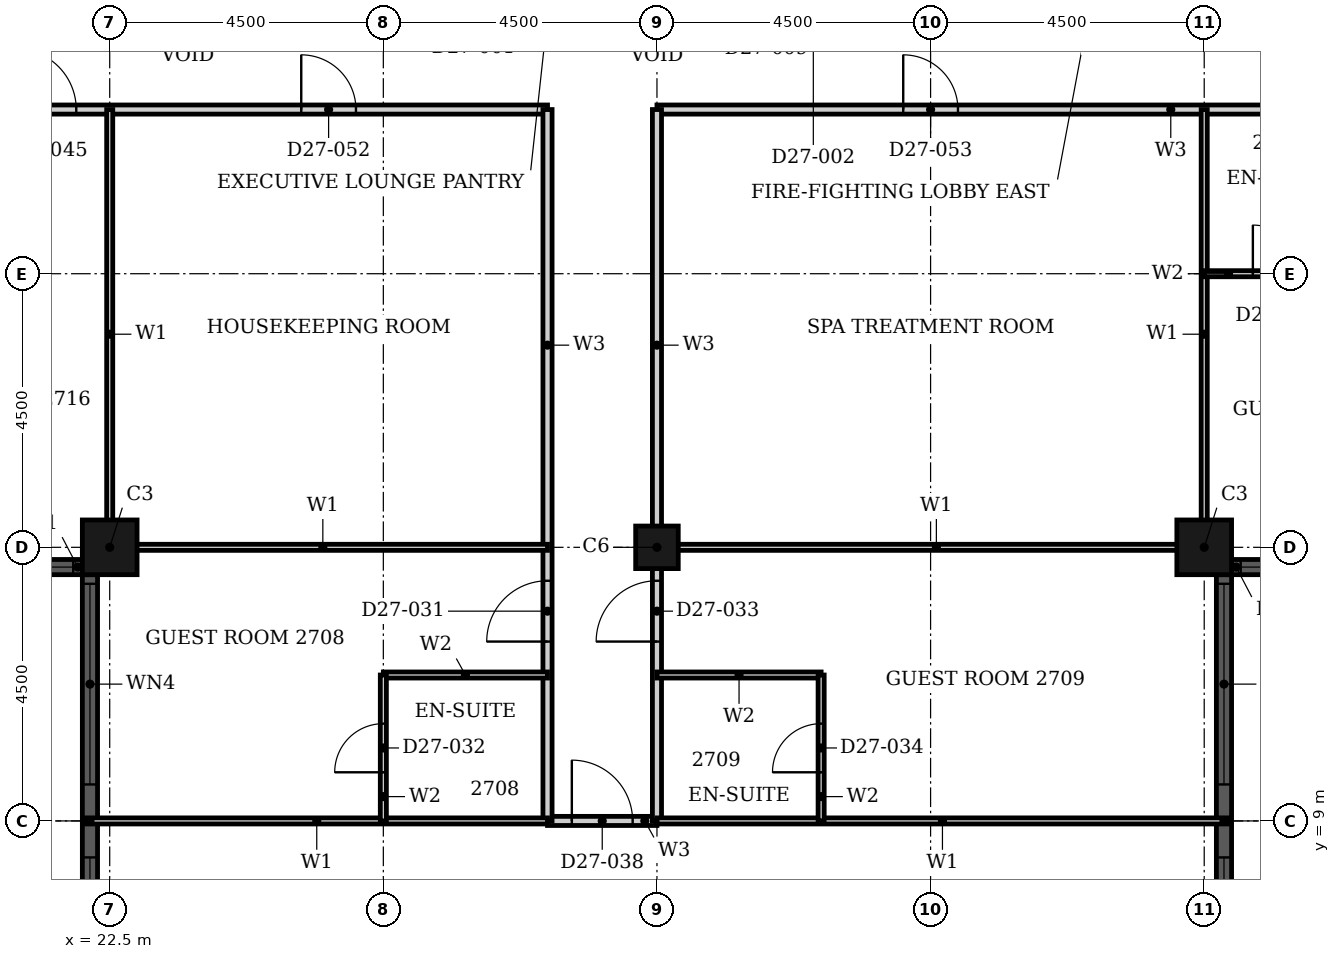
"""IFC4 building model, lengths in metres.
Left out: names, types, materials, properties, quantities, classifications, styles, units other than length and angle.
Written with IfcOpenShell. Run it as: python <this file> out.ifc"""

import sys

from ifc_helpers import new_model, si_unit, direction, frame, frame_2d, origin, origin_2d, place, context, subcontext, project, spatial, rectangle, hollow_rectangle, extrude, element, fill, save


model = new_model("IFC4")
c1 = context("Model", 3, precision=1e-05, world=origin(), true_north=direction((0.0, 1.0)))
c2 = subcontext(c1, "Body", "Model", "MODEL_VIEW")
j1 = project(units=[si_unit("LENGTHUNIT", "METRE"), si_unit("PLANEANGLEUNIT", "RADIAN")], contexts=[c1])
p1 = place(None, origin())
s1 = spatial("IfcSite", under=j1, at=p1, CompositionType="ELEMENT")
p2 = place(p1, origin())
s2 = spatial("IfcBuilding", under=s1, at=p2, CompositionType="ELEMENT")
p3 = place(p2, frame((0.0, 0.0, 111.6)))
s3 = spatial("IfcBuildingStorey", under=s2, at=p3, CompositionType="ELEMENT", Elevation=111.6)
for number, where, z_axis, x_axis in (
    (1, (40.5, 13.5, 0.0), (0.0, 0.0, 1.0), (1.0, 0.0, 0.0)),
    (2, (22.5, 13.5, 0.0), (0.0, 0.0, 1.0), (1.0, 0.0, 0.0)),
):
    element("IfcColumn", number, at=place(p3, frame(where, z_axis=z_axis, x_axis=x_axis)), inside=s3, PredefinedType="COLUMN", context=c2, shape_type="SweptSolid", body=[
        extrude(hollow_rectangle(XDim=0.9, YDim=0.9, WallThickness=0.028, at=origin_2d()), origin(), (0.0, 0.0, 1.0), 3.6),
    ])
p4 = place(p3, frame((31.5, 13.5, 0.0), z_axis=(0.0, 0.0, 1.0), x_axis=(1.0, 0.0, 0.0)))
e3 = element("IfcColumn", 3, at=p4, inside=s3, PredefinedType="COLUMN", context=c2, shape_type="SweptSolid", body=[
    extrude(hollow_rectangle(XDim=0.7, YDim=0.7, WallThickness=0.022, at=origin_2d()), origin(), (0.0, 0.0, 1.0), 3.6),
])
p5 = place(p3, frame((40.825, 4.95, 0.0), z_axis=(0.0, 0.0, 1.0), x_axis=(0.0, 1.0, 0.0)))
e4 = element("IfcWall", 4, at=p5, inside=s3, PredefinedType="SOLIDWALL", context=c2, shape_type="SweptSolid", body=[
    extrude(rectangle(XDim=8.1, YDim=0.25, at=frame_2d((4.05, 0.0))), origin(), (0.0, 0.0, 1.0), 3.6),
])
p6 = place(p5, frame((0.15, 0.0, 0.9)))
e5 = element("IfcOpeningElement", 5, at=p6, cuts=e4, PredefinedType="OPENING", context=c2, shape_type="SweptSolid", body=[
    extrude(rectangle(XDim=3.3, YDim=2.08, at=frame_2d((1.65, 1.04))), frame((0.0, 0.135, 0.0), z_axis=(0.0, -1.0, 0.0), x_axis=(1.0, 0.0, 0.0)), (0.0, 0.0, 1.0), 0.27),
])
p7 = place(p5, frame((4.65, 0.0, 0.9)))
e6 = element("IfcOpeningElement", 6, at=p7, cuts=e4, PredefinedType="OPENING", context=c2, shape_type="SweptSolid", body=[
    extrude(rectangle(XDim=3.3, YDim=2.08, at=frame_2d((1.65, 1.04))), frame((0.0, 0.135, 0.0), z_axis=(0.0, -1.0, 0.0), x_axis=(1.0, 0.0, 0.0)), (0.0, 0.0, 1.0), 0.27),
])
p8 = place(p3, frame((40.95, 13.175, 0.0), z_axis=(0.0, 0.0, 1.0), x_axis=(1.0, 0.0, 0.0)))
e7 = element("IfcWall", 7, at=p8, inside=s3, PredefinedType="SOLIDWALL", context=c2, shape_type="SweptSolid", body=[
    extrude(rectangle(XDim=3.6, YDim=0.25, at=frame_2d((1.8, 0.0))), origin(), (0.0, 0.0, 1.0), 3.6),
])
p9 = place(p8, frame((0.15, 0.0, 0.9)))
e8 = element("IfcOpeningElement", 8, at=p9, cuts=e7, PredefinedType="OPENING", context=c2, shape_type="SweptSolid", body=[
    extrude(rectangle(XDim=3.3, YDim=2.08, at=frame_2d((1.65, 1.04))), frame((0.0, 0.135, 0.0), z_axis=(0.0, -1.0, 0.0), x_axis=(1.0, 0.0, 0.0)), (0.0, 0.0, 1.0), 0.27),
])
p10 = place(p3, frame((18.45, 13.175, 0.0), z_axis=(0.0, 0.0, 1.0), x_axis=(1.0, 0.0, 0.0)))
e9 = element("IfcWall", 9, at=p10, inside=s3, PredefinedType="SOLIDWALL", context=c2, shape_type="SweptSolid", body=[
    extrude(rectangle(XDim=3.6, YDim=0.25, at=frame_2d((1.8, 0.0))), origin(), (0.0, 0.0, 1.0), 3.6),
])
p11 = place(p10, frame((0.15, 0.0, 0.9)))
e10 = element("IfcOpeningElement", 10, at=p11, cuts=e9, PredefinedType="OPENING", context=c2, shape_type="SweptSolid", body=[
    extrude(rectangle(XDim=3.3, YDim=2.08, at=frame_2d((1.65, 1.04))), frame((0.0, 0.135, 0.0), z_axis=(0.0, -1.0, 0.0), x_axis=(1.0, 0.0, 0.0)), (0.0, 0.0, 1.0), 0.27),
])
p12 = place(p3, frame((22.175, 13.05, 0.0), z_axis=(0.0, 0.0, 1.0), x_axis=(0.0, -1.0, 0.0)))
e11 = element("IfcWall", 11, at=p12, inside=s3, PredefinedType="SOLIDWALL", context=c2, shape_type="SweptSolid", body=[
    extrude(rectangle(XDim=8.1, YDim=0.25, at=frame_2d((4.05, 0.0))), origin(), (0.0, 0.0, 1.0), 3.6),
])
p13 = place(p12, frame((0.15, 0.0, 0.9)))
e12 = element("IfcOpeningElement", 12, at=p13, cuts=e11, PredefinedType="OPENING", context=c2, shape_type="SweptSolid", body=[
    extrude(rectangle(XDim=3.3, YDim=2.08, at=frame_2d((1.65, 1.04))), frame((0.0, 0.135, 0.0), z_axis=(0.0, -1.0, 0.0), x_axis=(1.0, 0.0, 0.0)), (0.0, 0.0, 1.0), 0.27),
])
p14 = place(p12, frame((4.65, 0.0, 0.9)))
e13 = element("IfcOpeningElement", 13, at=p14, cuts=e11, PredefinedType="OPENING", context=c2, shape_type="SweptSolid", body=[
    extrude(rectangle(XDim=3.3, YDim=2.08, at=frame_2d((1.65, 1.04))), frame((0.0, 0.135, 0.0), z_axis=(0.0, -1.0, 0.0), x_axis=(1.0, 0.0, 0.0)), (0.0, 0.0, 1.0), 0.27),
])
p15 = place(p3, frame((16.2, 20.7, 0.0), z_axis=(0.0, 0.0, 1.0), x_axis=(1.0, 0.0, 0.0)))
e14 = element("IfcWall", 14, at=p15, inside=s3, PredefinedType="PARTITIONING", context=c2, shape_type="SweptSolid", body=[
    extrude(rectangle(XDim=13.5, YDim=0.15, at=frame_2d((6.75, 0.0))), origin(), (0.0, 0.0, 1.0), 3.3),
])
p16 = place(p15, frame((4.75, 0.0, 0.0)))
e15 = element("IfcOpeningElement", 15, at=p16, cuts=e14, PredefinedType="OPENING", context=c2, shape_type="SweptSolid", body=[
    extrude(rectangle(XDim=1.0, YDim=2.1, at=frame_2d((0.5, 1.05))), frame((0.0, 0.085, 0.0), z_axis=(0.0, -1.0, 0.0), x_axis=(1.0, 0.0, 0.0)), (0.0, 0.0, 1.0), 0.17),
])
p17 = place(p15, frame((9.45, 0.0, 0.0)))
e16 = element("IfcOpeningElement", 16, at=p17, cuts=e14, PredefinedType="OPENING", context=c2, shape_type="SweptSolid", body=[
    extrude(rectangle(XDim=0.9, YDim=2.1, at=frame_2d((0.45, 1.05))), frame((0.0, 0.085, 0.0), z_axis=(0.0, -1.0, 0.0), x_axis=(1.0, 0.0, 0.0)), (0.0, 0.0, 1.0), 0.17),
])
p18 = place(p3, frame((31.5, 20.7, 0.0), z_axis=(0.0, 0.0, 1.0), x_axis=(1.0, 0.0, 0.0)))
e17 = element("IfcWall", 17, at=p18, inside=s3, PredefinedType="PARTITIONING", context=c2, shape_type="SweptSolid", body=[
    extrude(rectangle(XDim=15.3, YDim=0.15, at=frame_2d((7.65, 0.0))), origin(), (0.0, 0.0, 1.0), 3.3),
])
p19 = place(p18, frame((11.95, 0.0, 0.0)))
e18 = element("IfcOpeningElement", 18, at=p19, cuts=e17, PredefinedType="OPENING", context=c2, shape_type="SweptSolid", body=[
    extrude(rectangle(XDim=1.0, YDim=2.1, at=frame_2d((0.5, 1.05))), frame((0.0, 0.085, 0.0), z_axis=(0.0, -1.0, 0.0), x_axis=(1.0, 0.0, 0.0)), (0.0, 0.0, 1.0), 0.17),
])
p20 = place(p18, frame((13.95, 0.0, 0.0)))
e19 = element("IfcOpeningElement", 19, at=p20, cuts=e17, PredefinedType="OPENING", context=c2, shape_type="SweptSolid", body=[
    extrude(rectangle(XDim=0.9, YDim=2.1, at=frame_2d((0.45, 1.05))), frame((0.0, 0.085, 0.0), z_axis=(0.0, -1.0, 0.0), x_axis=(1.0, 0.0, 0.0)), (0.0, 0.0, 1.0), 0.17),
])
p21 = place(p18, frame((4.05, 0.0, 0.0)))
e20 = element("IfcOpeningElement", 20, at=p21, cuts=e17, PredefinedType="OPENING", context=c2, shape_type="SweptSolid", body=[
    extrude(rectangle(XDim=0.9, YDim=2.1, at=frame_2d((0.45, 1.05))), frame((0.0, 0.085, 0.0), z_axis=(0.0, -1.0, 0.0), x_axis=(1.0, 0.0, 0.0)), (0.0, 0.0, 1.0), 0.17),
])
p22 = place(p3, frame((29.7, 9.0, 0.0), z_axis=(0.0, 0.0, 1.0), x_axis=(1.0, 0.0, 0.0)))
e21 = element("IfcWall", 21, at=p22, inside=s3, PredefinedType="PARTITIONING", context=c2, shape_type="SweptSolid", body=[
    extrude(rectangle(XDim=1.8, YDim=0.15, at=frame_2d((0.9, 0.0))), origin(), (0.0, 0.0, 1.0), 3.3),
])
p23 = place(p22, frame((0.4, 0.0, 0.0)))
e22 = element("IfcOpeningElement", 22, at=p23, cuts=e21, PredefinedType="OPENING", context=c2, shape_type="SweptSolid", body=[
    extrude(rectangle(XDim=1.0, YDim=2.1, at=frame_2d((0.5, 1.05))), frame((0.0, 0.085, 0.0), z_axis=(0.0, -1.0, 0.0), x_axis=(1.0, 0.0, 0.0)), (0.0, 0.0, 1.0), 0.17),
])
p24 = place(p3, frame((29.7, 9.0, 0.0), z_axis=(0.0, 0.0, 1.0), x_axis=(0.0, 1.0, 0.0)))
e23 = element("IfcWall", 23, at=p24, inside=s3, PredefinedType="PARTITIONING", context=c2, shape_type="SweptSolid", body=[
    extrude(rectangle(XDim=11.7, YDim=0.15, at=frame_2d((5.85, 0.0))), origin(), (0.0, 0.0, 1.0), 3.3),
])
p25 = place(p24, frame((2.95, 0.0, 0.0)))
e24 = element("IfcOpeningElement", 24, at=p25, cuts=e23, PredefinedType="OPENING", context=c2, shape_type="SweptSolid", body=[
    extrude(rectangle(XDim=1.0, YDim=2.1, at=frame_2d((0.5, 1.05))), frame((0.0, 0.085, 0.0), z_axis=(0.0, -1.0, 0.0), x_axis=(1.0, 0.0, 0.0)), (0.0, 0.0, 1.0), 0.17),
])
p26 = place(p3, frame((31.5, 9.0, 0.0), z_axis=(0.0, 0.0, 1.0), x_axis=(0.0, 1.0, 0.0)))
e25 = element("IfcWall", 25, at=p26, inside=s3, PredefinedType="PARTITIONING", context=c2, shape_type="SweptSolid", body=[
    extrude(rectangle(XDim=11.7, YDim=0.15, at=frame_2d((5.85, 0.0))), origin(), (0.0, 0.0, 1.0), 2.58),
])
p27 = place(p26, frame((2.95, 0.0, 0.0)))
e26 = element("IfcOpeningElement", 26, at=p27, cuts=e25, PredefinedType="OPENING", context=c2, shape_type="SweptSolid", body=[
    extrude(rectangle(XDim=1.0, YDim=2.1, at=frame_2d((0.5, 1.05))), frame((0.0, 0.085, 0.0), z_axis=(0.0, -1.0, 0.0), x_axis=(1.0, 0.0, 0.0)), (0.0, 0.0, 1.0), 0.17),
])
p28 = place(p3, frame((31.5, 13.5, 0.0), z_axis=(0.0, 0.0, 1.0), x_axis=(1.0, 0.0, 0.0)))
e27 = element("IfcWall", 27, at=p28, inside=s3, PredefinedType="PARTITIONING", context=c2, shape_type="SweptSolid", body=[
    extrude(rectangle(XDim=9.19, YDim=0.1, at=frame_2d((4.595, 0.0))), origin(), (0.0, 0.0, 1.0), 2.38),
])
p29 = place(p3, frame((22.31, 13.5, 0.0), z_axis=(0.0, 0.0, 1.0), x_axis=(1.0, 0.0, 0.0)))
e28 = element("IfcWall", 28, at=p29, inside=s3, PredefinedType="PARTITIONING", context=c2, shape_type="SweptSolid", body=[
    extrude(rectangle(XDim=7.39, YDim=0.1, at=frame_2d((3.695, 0.0))), origin(), (0.0, 0.0, 1.0), 2.38),
])
p30 = place(p3, frame((31.5, 9.0, 0.0), z_axis=(0.0, 0.0, 1.0), x_axis=(1.0, 0.0, 0.0)))
e29 = element("IfcWall", 29, at=p30, inside=s3, PredefinedType="PARTITIONING", context=c2, shape_type="SweptSolid", body=[
    extrude(rectangle(XDim=9.39, YDim=0.1, at=frame_2d((4.695, 0.0))), origin(), (0.0, 0.0, 1.0), 3.3),
])
p31 = place(p3, frame((22.11, 9.0, 0.0), z_axis=(0.0, 0.0, 1.0), x_axis=(1.0, 0.0, 0.0)))
e30 = element("IfcWall", 30, at=p31, inside=s3, PredefinedType="PARTITIONING", context=c2, shape_type="SweptSolid", body=[
    extrude(rectangle(XDim=7.59, YDim=0.1, at=frame_2d((3.795, 0.0))), origin(), (0.0, 0.0, 1.0), 3.3),
])
for number, where, z_axis, x_axis in (
    (31, (22.5, 13.31, 0.0), (0.0, 0.0, 1.0), (0.0, 1.0, 0.0)),
    (32, (40.5, 13.31, 0.0), (0.0, 0.0, 1.0), (0.0, 1.0, 0.0)),
):
    element("IfcWall", number, at=place(p3, frame(where, z_axis=z_axis, x_axis=x_axis)), inside=s3, PredefinedType="PARTITIONING", context=c2, shape_type="SweptSolid", body=[
        extrude(rectangle(XDim=7.39, YDim=0.1, at=frame_2d((3.695, 0.0))), origin(), (0.0, 0.0, 1.0), 3.3),
    ])
for number, where, z_axis, x_axis in (
    (33, (31.5, 11.4, 0.0), (0.0, 0.0, 1.0), (1.0, 0.0, 0.0)),
    (34, (27.0, 11.4, 0.0), (0.0, 0.0, 1.0), (1.0, 0.0, 0.0)),
):
    element("IfcWall", number, at=place(p3, frame(where, z_axis=z_axis, x_axis=x_axis)), inside=s3, PredefinedType="PARTITIONING", context=c2, shape_type="SweptSolid", body=[
        extrude(rectangle(XDim=2.7, YDim=0.1, at=frame_2d((1.35, 0.0))), origin(), (0.0, 0.0, 1.0), 3.3),
    ])
p32 = place(p3, frame((40.5, 18.0, 0.0), z_axis=(0.0, 0.0, 1.0), x_axis=(1.0, 0.0, 0.0)))
e35 = element("IfcWall", 35, at=p32, inside=s3, PredefinedType="PARTITIONING", context=c2, shape_type="SweptSolid", body=[
    extrude(rectangle(XDim=2.4, YDim=0.1, at=frame_2d((1.2, 0.0))), origin(), (0.0, 0.0, 1.0), 3.3),
])
p33 = place(p32, frame((0.8, 0.0, 0.0)))
e36 = element("IfcOpeningElement", 36, at=p33, cuts=e35, PredefinedType="OPENING", context=c2, shape_type="SweptSolid", body=[
    extrude(rectangle(XDim=0.8, YDim=2.1, at=frame_2d((0.4, 1.05))), frame((0.0, 0.06, 0.0), z_axis=(0.0, -1.0, 0.0), x_axis=(1.0, 0.0, 0.0)), (0.0, 0.0, 1.0), 0.12),
])
p34 = place(p3, frame((27.0, 9.0, 0.0), z_axis=(0.0, 0.0, 1.0), x_axis=(0.0, 1.0, 0.0)))
e37 = element("IfcWall", 37, at=p34, inside=s3, PredefinedType="PARTITIONING", context=c2, shape_type="SweptSolid", body=[
    extrude(rectangle(XDim=2.4, YDim=0.1, at=frame_2d((1.2, 0.0))), origin(), (0.0, 0.0, 1.0), 2.58),
])
p35 = place(p34, frame((0.8, 0.0, 0.0)))
e38 = element("IfcOpeningElement", 38, at=p35, cuts=e37, PredefinedType="OPENING", context=c2, shape_type="SweptSolid", body=[
    extrude(rectangle(XDim=0.8, YDim=2.1, at=frame_2d((0.4, 1.05))), frame((0.0, 0.06, 0.0), z_axis=(0.0, -1.0, 0.0), x_axis=(1.0, 0.0, 0.0)), (0.0, 0.0, 1.0), 0.12),
])
p36 = place(p3, frame((34.2, 9.0, 0.0), z_axis=(0.0, 0.0, 1.0), x_axis=(0.0, 1.0, 0.0)))
e39 = element("IfcWall", 39, at=p36, inside=s3, PredefinedType="PARTITIONING", context=c2, shape_type="SweptSolid", body=[
    extrude(rectangle(XDim=2.4, YDim=0.1, at=frame_2d((1.2, 0.0))), origin(), (0.0, 0.0, 1.0), 3.3),
])
p37 = place(p36, frame((0.8, 0.0, 0.0)))
e40 = element("IfcOpeningElement", 40, at=p37, cuts=e39, PredefinedType="OPENING", context=c2, shape_type="SweptSolid", body=[
    extrude(rectangle(XDim=0.8, YDim=2.1, at=frame_2d((0.4, 1.05))), frame((0.0, 0.06, 0.0), z_axis=(0.0, -1.0, 0.0), x_axis=(1.0, 0.0, 0.0)), (0.0, 0.0, 1.0), 0.12),
])
p38 = place(p6, origin())
e41 = element("IfcWindow", 41, at=p38, inside=s3, PartitioningType="SINGLE_PANEL", PredefinedType="WINDOW", context=c2, shape_type="SweptSolid", body=[
    extrude(rectangle(XDim=3.3, YDim=2.08, at=frame_2d((1.65, 1.04))), frame((0.0, 0.03, 0.0), z_axis=(0.0, -1.0, 0.0), x_axis=(1.0, 0.0, 0.0)), (0.0, 0.0, 1.0), 0.06),
])
fill(e5, e41)
p39 = place(p7, origin())
e42 = element("IfcWindow", 42, at=p39, inside=s3, PartitioningType="SINGLE_PANEL", PredefinedType="WINDOW", context=c2, shape_type="SweptSolid", body=[
    extrude(rectangle(XDim=3.3, YDim=2.08, at=frame_2d((1.65, 1.04))), frame((0.0, 0.03, 0.0), z_axis=(0.0, -1.0, 0.0), x_axis=(1.0, 0.0, 0.0)), (0.0, 0.0, 1.0), 0.06),
])
fill(e6, e42)
p40 = place(p9, origin())
e43 = element("IfcWindow", 43, at=p40, inside=s3, PartitioningType="SINGLE_PANEL", PredefinedType="WINDOW", context=c2, shape_type="SweptSolid", body=[
    extrude(rectangle(XDim=3.3, YDim=2.08, at=frame_2d((1.65, 1.04))), frame((0.0, 0.03, 0.0), z_axis=(0.0, -1.0, 0.0), x_axis=(1.0, 0.0, 0.0)), (0.0, 0.0, 1.0), 0.06),
])
fill(e8, e43)
p41 = place(p11, origin())
e44 = element("IfcWindow", 44, at=p41, inside=s3, PartitioningType="SINGLE_PANEL", PredefinedType="WINDOW", context=c2, shape_type="SweptSolid", body=[
    extrude(rectangle(XDim=3.3, YDim=2.08, at=frame_2d((1.65, 1.04))), frame((0.0, 0.03, 0.0), z_axis=(0.0, -1.0, 0.0), x_axis=(1.0, 0.0, 0.0)), (0.0, 0.0, 1.0), 0.06),
])
fill(e10, e44)
p42 = place(p13, origin())
e45 = element("IfcWindow", 45, at=p42, inside=s3, PartitioningType="SINGLE_PANEL", PredefinedType="WINDOW", context=c2, shape_type="SweptSolid", body=[
    extrude(rectangle(XDim=3.3, YDim=2.08, at=frame_2d((1.65, 1.04))), frame((0.0, 0.03, 0.0), z_axis=(0.0, -1.0, 0.0), x_axis=(1.0, 0.0, 0.0)), (0.0, 0.0, 1.0), 0.06),
])
fill(e12, e45)
p43 = place(p14, origin())
e46 = element("IfcWindow", 46, at=p43, inside=s3, PartitioningType="SINGLE_PANEL", PredefinedType="WINDOW", context=c2, shape_type="SweptSolid", body=[
    extrude(rectangle(XDim=3.3, YDim=2.08, at=frame_2d((1.65, 1.04))), frame((0.0, 0.03, 0.0), z_axis=(0.0, -1.0, 0.0), x_axis=(1.0, 0.0, 0.0)), (0.0, 0.0, 1.0), 0.06),
])
fill(e13, e46)
p44 = place(p25, origin())
e47 = element("IfcDoor", 47, at=p44, inside=s3, OperationType="SINGLE_SWING_RIGHT", PredefinedType="DOOR", context=c2, shape_type="SweptSolid", body=[
    extrude(rectangle(XDim=1.0, YDim=2.1, at=frame_2d((0.5, 1.05))), frame((0.0, 0.025, 0.0), z_axis=(0.0, -1.0, 0.0), x_axis=(1.0, 0.0, 0.0)), (0.0, 0.0, 1.0), 0.05),
])
fill(e24, e47)
p45 = place(p35, origin())
e48 = element("IfcDoor", 48, at=p45, inside=s3, OperationType="SINGLE_SWING_RIGHT", PredefinedType="DOOR", context=c2, shape_type="SweptSolid", body=[
    extrude(rectangle(XDim=0.8, YDim=2.1, at=frame_2d((0.4, 1.05))), frame((0.0, 0.025, 0.0), z_axis=(0.0, -1.0, 0.0), x_axis=(1.0, 0.0, 0.0)), (0.0, 0.0, 1.0), 0.05),
])
fill(e38, e48)
p46 = place(p27, origin())
e49 = element("IfcDoor", 49, at=p46, inside=s3, OperationType="SINGLE_SWING_RIGHT", PredefinedType="DOOR", context=c2, shape_type="SweptSolid", body=[
    extrude(rectangle(XDim=1.0, YDim=2.1, at=frame_2d((0.5, 1.05))), frame((0.0, 0.025, 0.0), z_axis=(0.0, -1.0, 0.0), x_axis=(1.0, 0.0, 0.0)), (0.0, 0.0, 1.0), 0.05),
])
fill(e26, e49)
p47 = place(p37, origin())
e50 = element("IfcDoor", 50, at=p47, inside=s3, OperationType="SINGLE_SWING_RIGHT", PredefinedType="DOOR", context=c2, shape_type="SweptSolid", body=[
    extrude(rectangle(XDim=0.8, YDim=2.1, at=frame_2d((0.4, 1.05))), frame((0.0, 0.025, 0.0), z_axis=(0.0, -1.0, 0.0), x_axis=(1.0, 0.0, 0.0)), (0.0, 0.0, 1.0), 0.05),
])
fill(e40, e50)
p48 = place(p23, origin())
e51 = element("IfcDoor", 51, at=p48, inside=s3, OperationType="SINGLE_SWING_RIGHT", PredefinedType="DOOR", context=c2, shape_type="SweptSolid", body=[
    extrude(rectangle(XDim=1.0, YDim=2.1, at=frame_2d((0.5, 1.05))), frame((0.0, 0.025, 0.0), z_axis=(0.0, -1.0, 0.0), x_axis=(1.0, 0.0, 0.0)), (0.0, 0.0, 1.0), 0.05),
])
fill(e22, e51)
p49 = place(p16, origin())
e52 = element("IfcDoor", 52, at=p49, inside=s3, OperationType="SINGLE_SWING_RIGHT", PredefinedType="DOOR", context=c2, shape_type="SweptSolid", body=[
    extrude(rectangle(XDim=1.0, YDim=2.1, at=frame_2d((0.5, 1.05))), frame((0.0, 0.025, 0.0), z_axis=(0.0, -1.0, 0.0), x_axis=(1.0, 0.0, 0.0)), (0.0, 0.0, 1.0), 0.05),
])
fill(e15, e52)
p50 = place(p33, origin())
e53 = element("IfcDoor", 53, at=p50, inside=s3, OperationType="SINGLE_SWING_LEFT", PredefinedType="DOOR", context=c2, shape_type="SweptSolid", body=[
    extrude(rectangle(XDim=0.8, YDim=2.1, at=frame_2d((0.4, 1.05))), frame((0.0, 0.025, 0.0), z_axis=(0.0, -1.0, 0.0), x_axis=(1.0, 0.0, 0.0)), (0.0, 0.0, 1.0), 0.05),
])
fill(e36, e53)
p51 = place(p17, origin())
e54 = element("IfcDoor", 54, at=p51, inside=s3, OperationType="SINGLE_SWING_RIGHT", PredefinedType="DOOR", context=c2, shape_type="SweptSolid", body=[
    extrude(rectangle(XDim=0.9, YDim=2.1, at=frame_2d((0.45, 1.05))), frame((0.0, 0.025, 0.0), z_axis=(0.0, -1.0, 0.0), x_axis=(1.0, 0.0, 0.0)), (0.0, 0.0, 1.0), 0.05),
])
fill(e16, e54)
p52 = place(p21, origin())
e55 = element("IfcDoor", 55, at=p52, inside=s3, OperationType="SINGLE_SWING_RIGHT", PredefinedType="DOOR", context=c2, shape_type="SweptSolid", body=[
    extrude(rectangle(XDim=0.9, YDim=2.1, at=frame_2d((0.45, 1.05))), frame((0.0, 0.025, 0.0), z_axis=(0.0, -1.0, 0.0), x_axis=(1.0, 0.0, 0.0)), (0.0, 0.0, 1.0), 0.05),
])
fill(e20, e55)
save(model, sys.argv[1])
